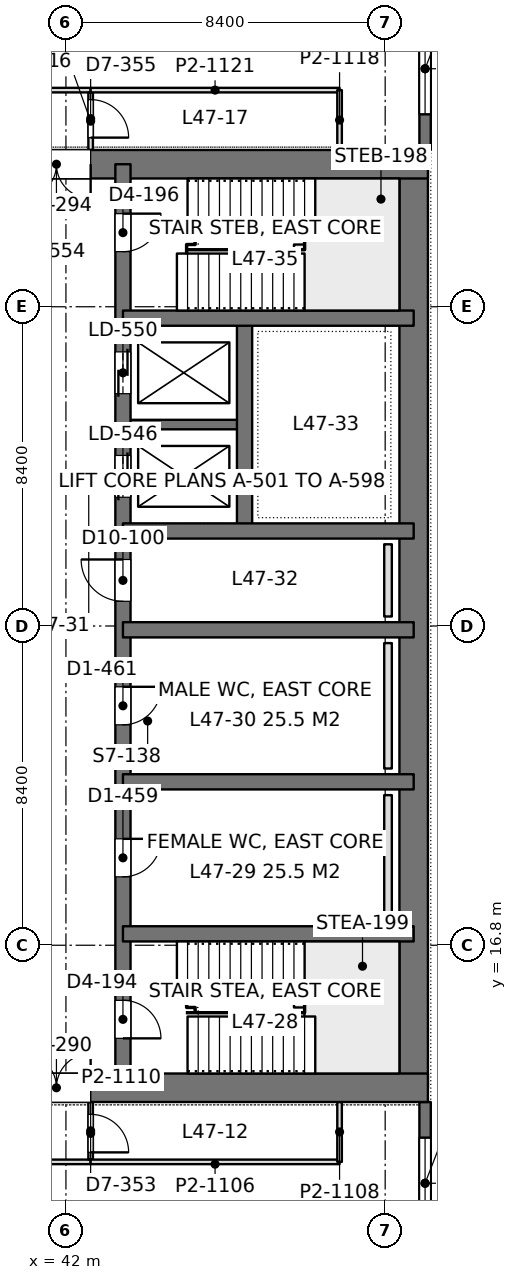
"""IFC4 building model, lengths in metres.
Left out: names, types, materials, properties, quantities, classifications, styles, units other than length and angle.
Written with IfcOpenShell. Run it as: python <this file> out.ifc"""

import sys

from ifc_helpers import new_model, si_unit, direction, frame, frame_2d, origin, place, context, subcontext, project, spatial, rectangle, extrude, element, fill, save


model = new_model("IFC4")
c1 = context("Model", 3, precision=1e-05, world=origin(), true_north=direction((0.0, 1.0)))
c2 = subcontext(c1, "Body", "Model", "MODEL_VIEW")
j1 = project(units=[si_unit("LENGTHUNIT", "METRE"), si_unit("PLANEANGLEUNIT", "RADIAN")], contexts=[c1])
p1 = place(None, origin())
s1 = spatial("IfcSite", under=j1, at=p1, CompositionType="ELEMENT")
p2 = place(p1, origin())
s2 = spatial("IfcBuilding", under=s1, at=p2, CompositionType="ELEMENT")
p3 = place(p2, frame((0.0, 0.0, 207.0)))
s3 = spatial("IfcBuildingStorey", under=s2, at=p3, CompositionType="ELEMENT", Elevation=207.0)
p4 = place(p3, frame((33.675, 13.05, 0.0), z_axis=(0.0, 0.0, 1.0), x_axis=(1.0, 0.0, 0.0)))
e1 = element("IfcWall", 1, at=p4, inside=s3, PredefinedType="SHEAR", context=c2, shape_type="SweptSolid", body=[
    extrude(rectangle(XDim=17.85, YDim=0.75, at=frame_2d((8.925, 0.0))), origin(), (0.0, 0.0, 1.0), 4.2),
])
p5 = place(p4, frame((7.175, 0.0, 0.0)))
e2 = element("IfcOpeningElement", 2, at=p5, cuts=e1, PredefinedType="OPENING", context=c2, shape_type="SweptSolid", body=[
    extrude(rectangle(XDim=1.8, YDim=2.4, at=frame_2d((0.9, 1.2))), frame((0.0, 0.385, 0.0), z_axis=(0.0, -1.0, 0.0), x_axis=(1.0, 0.0, 0.0)), (0.0, 0.0, 1.0), 0.77),
])
p6 = place(p3, frame((33.675, 37.35, 0.0), z_axis=(0.0, 0.0, 1.0), x_axis=(1.0, 0.0, 0.0)))
e3 = element("IfcWall", 3, at=p6, inside=s3, PredefinedType="SHEAR", context=c2, shape_type="SweptSolid", body=[
    extrude(rectangle(XDim=17.85, YDim=0.75, at=frame_2d((8.925, 0.0))), origin(), (0.0, 0.0, 1.0), 4.2),
])
p7 = place(p6, frame((7.175, 0.0, 0.0)))
e4 = element("IfcOpeningElement", 4, at=p7, cuts=e3, PredefinedType="OPENING", context=c2, shape_type="SweptSolid", body=[
    extrude(rectangle(XDim=1.8, YDim=2.4, at=frame_2d((0.9, 1.2))), frame((0.0, 0.385, 0.0), z_axis=(0.0, -1.0, 0.0), x_axis=(1.0, 0.0, 0.0)), (0.0, 0.0, 1.0), 0.77),
])
p8 = place(p3, frame((51.15, 13.05, 0.0), z_axis=(0.0, 0.0, 1.0), x_axis=(0.0, 1.0, 0.0)))
e5 = element("IfcWall", 5, at=p8, inside=s3, PredefinedType="SHEAR", context=c2, shape_type="SweptSolid", body=[
    extrude(rectangle(XDim=24.3, YDim=0.75, at=frame_2d((12.15, 0.0))), origin(), (0.0, 0.0, 1.0), 4.2),
])
p9 = place(p3, frame((43.5, 13.05, 0.0), z_axis=(0.0, 0.0, 1.0), x_axis=(0.0, 1.0, 0.0)))
e6 = element("IfcWall", 6, at=p9, inside=s3, PredefinedType="SHEAR", context=c2, shape_type="SweptSolid", body=[
    extrude(rectangle(XDim=24.3, YDim=0.4, at=frame_2d((12.15, 0.0))), origin(), (0.0, 0.0, 1.0), 4.2),
])
p10 = place(p9, frame((1.3, 0.0, 0.0)))
e7 = element("IfcOpeningElement", 7, at=p10, cuts=e6, PredefinedType="OPENING", context=c2, shape_type="SweptSolid", body=[
    extrude(rectangle(XDim=1.0, YDim=2.2, at=frame_2d((0.5, 1.1))), frame((0.0, 0.21, 0.0), z_axis=(0.0, -1.0, 0.0), x_axis=(1.0, 0.0, 0.0)), (0.0, 0.0, 1.0), 0.42),
])
p11 = place(p9, frame((22.0, 0.0, 0.0)))
e8 = element("IfcOpeningElement", 8, at=p11, cuts=e6, PredefinedType="OPENING", context=c2, shape_type="SweptSolid", body=[
    extrude(rectangle(XDim=1.0, YDim=2.2, at=frame_2d((0.5, 1.1))), frame((0.0, 0.21, 0.0), z_axis=(0.0, -1.0, 0.0), x_axis=(1.0, 0.0, 0.0)), (0.0, 0.0, 1.0), 0.42),
])
p12 = place(p9, frame((5.55, 0.0, 0.0)))
e9 = element("IfcOpeningElement", 9, at=p12, cuts=e6, PredefinedType="OPENING", context=c2, shape_type="SweptSolid", body=[
    extrude(rectangle(XDim=1.0, YDim=2.2, at=frame_2d((0.5, 1.1))), frame((0.0, 0.21, 0.0), z_axis=(0.0, -1.0, 0.0), x_axis=(1.0, 0.0, 0.0)), (0.0, 0.0, 1.0), 0.42),
])
p13 = place(p9, frame((9.55, 0.0, 0.0)))
e10 = element("IfcOpeningElement", 10, at=p13, cuts=e6, PredefinedType="OPENING", context=c2, shape_type="SweptSolid", body=[
    extrude(rectangle(XDim=1.0, YDim=2.2, at=frame_2d((0.5, 1.1))), frame((0.0, 0.21, 0.0), z_axis=(0.0, -1.0, 0.0), x_axis=(1.0, 0.0, 0.0)), (0.0, 0.0, 1.0), 0.42),
])
p14 = place(p9, frame((12.8, 0.0, 0.0)))
e11 = element("IfcOpeningElement", 11, at=p14, cuts=e6, PredefinedType="OPENING", context=c2, shape_type="SweptSolid", body=[
    extrude(rectangle(XDim=1.1, YDim=2.2, at=frame_2d((0.55, 1.1))), frame((0.0, 0.21, 0.0), z_axis=(0.0, -1.0, 0.0), x_axis=(1.0, 0.0, 0.0)), (0.0, 0.0, 1.0), 0.42),
])
p15 = place(p9, frame((15.538, 0.0, 0.0)))
e12 = element("IfcOpeningElement", 12, at=p15, cuts=e6, PredefinedType="OPENING", context=c2, shape_type="SweptSolid", body=[
    extrude(rectangle(XDim=1.1, YDim=2.2, at=frame_2d((0.55, 1.1))), frame((0.0, 0.21, 0.0), z_axis=(0.0, -1.0, 0.0), x_axis=(1.0, 0.0, 0.0)), (0.0, 0.0, 1.0), 0.42),
])
p16 = place(p9, frame((18.262, 0.0, 0.0)))
e13 = element("IfcOpeningElement", 13, at=p16, cuts=e6, PredefinedType="OPENING", context=c2, shape_type="SweptSolid", body=[
    extrude(rectangle(XDim=1.1, YDim=2.2, at=frame_2d((0.55, 1.1))), frame((0.0, 0.21, 0.0), z_axis=(0.0, -1.0, 0.0), x_axis=(1.0, 0.0, 0.0)), (0.0, 0.0, 1.0), 0.42),
])
for number, where, z_axis, x_axis in (
    (14, (51.15, 17.1, 0.0), (0.0, 0.0, 1.0), (-1.0, 0.0, 0.0)),
    (15, (51.15, 21.1, 0.0), (0.0, 0.0, 1.0), (-1.0, 0.0, 0.0)),
    (16, (51.15, 25.1, 0.0), (0.0, 0.0, 1.0), (-1.0, 0.0, 0.0)),
    (17, (51.15, 27.7, 0.0), (0.0, 0.0, 1.0), (-1.0, 0.0, 0.0)),
    (18, (51.15, 33.3, 0.0), (0.0, 0.0, 1.0), (-1.0, 0.0, 0.0)),
):
    element("IfcWall", number, at=place(p3, frame(where, z_axis=z_axis, x_axis=x_axis)), inside=s3, PredefinedType="SHEAR", context=c2, shape_type="SweptSolid", body=[
        extrude(rectangle(XDim=7.65, YDim=0.4, at=frame_2d((3.825, 0.0))), origin(), (0.0, 0.0, 1.0), 4.2),
    ])
p17 = place(p3, frame((46.7, 27.7, 0.0), z_axis=(0.0, 0.0, 1.0), x_axis=(0.0, 1.0, 0.0)))
e19 = element("IfcWall", 19, at=p17, inside=s3, PredefinedType="SHEAR", context=c2, shape_type="SweptSolid", body=[
    extrude(rectangle(XDim=5.6, YDim=0.4, at=frame_2d((2.8, 0.0))), origin(), (0.0, 0.0, 1.0), 4.2),
])
p18 = place(p3, frame((46.7, 30.5, 0.0), z_axis=(0.0, 0.0, 1.0), x_axis=(-1.0, 0.0, 0.0)))
e20 = element("IfcWall", 20, at=p18, inside=s3, PredefinedType="SHEAR", context=c2, shape_type="SweptSolid", body=[
    extrude(rectangle(XDim=3.2, YDim=0.25, at=frame_2d((1.6, 0.0))), origin(), (0.0, 0.0, 1.0), 4.2),
])
p19 = place(p3, frame((51.45, 42.0, 0.0), z_axis=(0.0, 0.0, 1.0), x_axis=(0.0, -1.0, 0.0)))
e21 = element("IfcWall", 21, at=p19, inside=s3, PredefinedType="SOLIDWALL", context=c2, shape_type="SweptSolid", body=[
    extrude(rectangle(XDim=4.275, YDim=0.3, at=frame_2d((2.137, 0.0))), origin(), (0.0, 0.0, 1.0), 4.05),
])
p20 = place(p19, frame((0.938, 0.0, 0.9)))
e22 = element("IfcOpeningElement", 22, at=p20, cuts=e21, PredefinedType="OPENING", context=c2, shape_type="SweptSolid", body=[
    extrude(rectangle(XDim=2.4, YDim=1.9, at=frame_2d((1.2, 0.95))), frame((0.0, 0.16, 0.0), z_axis=(0.0, -1.0, 0.0), x_axis=(1.0, 0.0, 0.0)), (0.0, 0.0, 1.0), 0.32),
])
p21 = place(p3, frame((51.45, 12.675, 0.0), z_axis=(0.0, 0.0, 1.0), x_axis=(0.0, -1.0, 0.0)))
e23 = element("IfcWall", 23, at=p21, inside=s3, PredefinedType="SOLIDWALL", context=c2, shape_type="SweptSolid", body=[
    extrude(rectangle(XDim=4.275, YDim=0.3, at=frame_2d((2.138, 0.0))), origin(), (0.0, 0.0, 1.0), 4.05),
])
p22 = place(p21, frame((0.938, 0.0, 0.9)))
e24 = element("IfcOpeningElement", 24, at=p22, cuts=e23, PredefinedType="OPENING", context=c2, shape_type="SweptSolid", body=[
    extrude(rectangle(XDim=2.4, YDim=1.9, at=frame_2d((1.2, 0.95))), frame((0.0, 0.16, 0.0), z_axis=(0.0, -1.0, 0.0), x_axis=(1.0, 0.0, 0.0)), (0.0, 0.0, 1.0), 0.32),
])
p23 = place(p3, frame((7.748, 11.1, 0.0), z_axis=(0.0, 0.0, 1.0), x_axis=(1.0, 0.0, 0.0)))
e25 = element("IfcWall", 25, at=p23, inside=s3, PredefinedType="PARTITIONING", context=c2, shape_type="SweptSolid", body=[
    extrude(rectangle(XDim=34.904, YDim=0.12, at=frame_2d((17.452, 0.0))), origin(), (0.0, 0.0, 1.0), 3.55),
])
p24 = place(p23, frame((2.119, 0.0, 0.0)))
e26 = element("IfcOpeningElement", 26, at=p24, cuts=e25, PredefinedType="OPENING", context=c2, shape_type="SweptSolid", body=[
    extrude(rectangle(XDim=1.8, YDim=2.2, at=frame_2d((0.9, 1.1))), frame((0.0, 0.07, 0.0), z_axis=(0.0, -1.0, 0.0), x_axis=(1.0, 0.0, 0.0)), (0.0, 0.0, 1.0), 0.14),
])
p25 = place(p23, frame((5.135, 0.0, 0.0)))
e27 = element("IfcOpeningElement", 27, at=p25, cuts=e25, PredefinedType="OPENING", context=c2, shape_type="SweptSolid", body=[
    extrude(rectangle(XDim=1.8, YDim=2.2, at=frame_2d((0.9, 1.1))), frame((0.0, 0.07, 0.0), z_axis=(0.0, -1.0, 0.0), x_axis=(1.0, 0.0, 0.0)), (0.0, 0.0, 1.0), 0.14),
])
p26 = place(p23, frame((13.752, 0.0, 0.0)))
e28 = element("IfcOpeningElement", 28, at=p26, cuts=e25, PredefinedType="OPENING", context=c2, shape_type="SweptSolid", body=[
    extrude(rectangle(XDim=1.8, YDim=2.2, at=frame_2d((0.9, 1.1))), frame((0.0, 0.07, 0.0), z_axis=(0.0, -1.0, 0.0), x_axis=(1.0, 0.0, 0.0)), (0.0, 0.0, 1.0), 0.14),
])
p27 = place(p23, frame((19.352, 0.0, 0.0)))
e29 = element("IfcOpeningElement", 29, at=p27, cuts=e25, PredefinedType="OPENING", context=c2, shape_type="SweptSolid", body=[
    extrude(rectangle(XDim=1.8, YDim=2.2, at=frame_2d((0.9, 1.1))), frame((0.0, 0.07, 0.0), z_axis=(0.0, -1.0, 0.0), x_axis=(1.0, 0.0, 0.0)), (0.0, 0.0, 1.0), 0.14),
])
p28 = place(p23, frame((27.969, 0.0, 0.0)))
e30 = element("IfcOpeningElement", 30, at=p28, cuts=e25, PredefinedType="OPENING", context=c2, shape_type="SweptSolid", body=[
    extrude(rectangle(XDim=1.8, YDim=2.2, at=frame_2d((0.9, 1.1))), frame((0.0, 0.07, 0.0), z_axis=(0.0, -1.0, 0.0), x_axis=(1.0, 0.0, 0.0)), (0.0, 0.0, 1.0), 0.14),
])
p29 = place(p23, frame((30.985, 0.0, 0.0)))
e31 = element("IfcOpeningElement", 31, at=p29, cuts=e25, PredefinedType="OPENING", context=c2, shape_type="SweptSolid", body=[
    extrude(rectangle(XDim=1.8, YDim=2.2, at=frame_2d((0.9, 1.1))), frame((0.0, 0.07, 0.0), z_axis=(0.0, -1.0, 0.0), x_axis=(1.0, 0.0, 0.0)), (0.0, 0.0, 1.0), 0.14),
])
p30 = place(p3, frame((42.65, 11.158, 0.0), z_axis=(0.0, 0.0, 1.0), x_axis=(0.0, 1.0, 0.0)))
e32 = element("IfcWall", 32, at=p30, inside=s3, PredefinedType="PARTITIONING", context=c2, shape_type="SweptSolid", body=[
    extrude(rectangle(XDim=1.518, YDim=0.12, at=frame_2d((0.759, 0.0))), origin(), (0.0, 0.0, 1.0), 4.05),
])
p31 = place(p30, frame((0.192, 0.0, 0.0)))
e33 = element("IfcOpeningElement", 33, at=p31, cuts=e32, PredefinedType="OPENING", context=c2, shape_type="SweptSolid", body=[
    extrude(rectangle(XDim=1.0, YDim=2.4, at=frame_2d((0.5, 1.2))), frame((0.0, 0.07, 0.0), z_axis=(0.0, -1.0, 0.0), x_axis=(1.0, 0.0, 0.0)), (0.0, 0.0, 1.0), 0.14),
])
p32 = place(p3, frame((42.648, 11.1, 0.0), z_axis=(0.0, 0.0, 1.0), x_axis=(1.0, 0.0, 0.0)))
e34 = element("IfcWall", 34, at=p32, inside=s3, PredefinedType="PARTITIONING", context=c2, shape_type="SweptSolid", body=[
    extrude(rectangle(XDim=6.552, YDim=0.12, at=frame_2d((3.276, 0.0))), origin(), (0.0, 0.0, 1.0), 4.05),
])
p33 = place(p3, frame((49.2, 11.1, 0.0), z_axis=(0.0, 0.0, 1.0), x_axis=(0.0, 1.0, 0.0)))
e35 = element("IfcWall", 35, at=p33, inside=s3, PredefinedType="PARTITIONING", context=c2, shape_type="SweptSolid", body=[
    extrude(rectangle(XDim=1.576, YDim=0.12, at=frame_2d((0.788, 0.0))), origin(), (0.0, 0.0, 1.0), 4.05),
])
p34 = place(p3, frame((7.748, 39.3, 0.0), z_axis=(0.0, 0.0, 1.0), x_axis=(1.0, 0.0, 0.0)))
e36 = element("IfcWall", 36, at=p34, inside=s3, PredefinedType="PARTITIONING", context=c2, shape_type="SweptSolid", body=[
    extrude(rectangle(XDim=34.904, YDim=0.12, at=frame_2d((17.452, 0.0))), origin(), (0.0, 0.0, 1.0), 3.55),
])
p35 = place(p34, frame((2.119, 0.0, 0.0)))
e37 = element("IfcOpeningElement", 37, at=p35, cuts=e36, PredefinedType="OPENING", context=c2, shape_type="SweptSolid", body=[
    extrude(rectangle(XDim=1.8, YDim=2.2, at=frame_2d((0.9, 1.1))), frame((0.0, 0.07, 0.0), z_axis=(0.0, -1.0, 0.0), x_axis=(1.0, 0.0, 0.0)), (0.0, 0.0, 1.0), 0.14),
])
p36 = place(p34, frame((5.135, 0.0, 0.0)))
e38 = element("IfcOpeningElement", 38, at=p36, cuts=e36, PredefinedType="OPENING", context=c2, shape_type="SweptSolid", body=[
    extrude(rectangle(XDim=1.8, YDim=2.2, at=frame_2d((0.9, 1.1))), frame((0.0, 0.07, 0.0), z_axis=(0.0, -1.0, 0.0), x_axis=(1.0, 0.0, 0.0)), (0.0, 0.0, 1.0), 0.14),
])
p37 = place(p34, frame((13.752, 0.0, 0.0)))
e39 = element("IfcOpeningElement", 39, at=p37, cuts=e36, PredefinedType="OPENING", context=c2, shape_type="SweptSolid", body=[
    extrude(rectangle(XDim=1.8, YDim=2.2, at=frame_2d((0.9, 1.1))), frame((0.0, 0.07, 0.0), z_axis=(0.0, -1.0, 0.0), x_axis=(1.0, 0.0, 0.0)), (0.0, 0.0, 1.0), 0.14),
])
p38 = place(p34, frame((19.352, 0.0, 0.0)))
e40 = element("IfcOpeningElement", 40, at=p38, cuts=e36, PredefinedType="OPENING", context=c2, shape_type="SweptSolid", body=[
    extrude(rectangle(XDim=1.8, YDim=2.2, at=frame_2d((0.9, 1.1))), frame((0.0, 0.07, 0.0), z_axis=(0.0, -1.0, 0.0), x_axis=(1.0, 0.0, 0.0)), (0.0, 0.0, 1.0), 0.14),
])
p39 = place(p34, frame((27.969, 0.0, 0.0)))
e41 = element("IfcOpeningElement", 41, at=p39, cuts=e36, PredefinedType="OPENING", context=c2, shape_type="SweptSolid", body=[
    extrude(rectangle(XDim=1.8, YDim=2.2, at=frame_2d((0.9, 1.1))), frame((0.0, 0.07, 0.0), z_axis=(0.0, -1.0, 0.0), x_axis=(1.0, 0.0, 0.0)), (0.0, 0.0, 1.0), 0.14),
])
p40 = place(p34, frame((30.985, 0.0, 0.0)))
e42 = element("IfcOpeningElement", 42, at=p40, cuts=e36, PredefinedType="OPENING", context=c2, shape_type="SweptSolid", body=[
    extrude(rectangle(XDim=1.8, YDim=2.2, at=frame_2d((0.9, 1.1))), frame((0.0, 0.07, 0.0), z_axis=(0.0, -1.0, 0.0), x_axis=(1.0, 0.0, 0.0)), (0.0, 0.0, 1.0), 0.14),
])
p41 = place(p3, frame((42.65, 37.724, 0.0), z_axis=(0.0, 0.0, 1.0), x_axis=(0.0, 1.0, 0.0)))
e43 = element("IfcWall", 43, at=p41, inside=s3, PredefinedType="PARTITIONING", context=c2, shape_type="SweptSolid", body=[
    extrude(rectangle(XDim=1.518, YDim=0.12, at=frame_2d((0.759, 0.0))), origin(), (0.0, 0.0, 1.0), 4.05),
])
p42 = place(p41, frame((0.326, 0.0, 0.0)))
e44 = element("IfcOpeningElement", 44, at=p42, cuts=e43, PredefinedType="OPENING", context=c2, shape_type="SweptSolid", body=[
    extrude(rectangle(XDim=1.0, YDim=2.4, at=frame_2d((0.5, 1.2))), frame((0.0, 0.07, 0.0), z_axis=(0.0, -1.0, 0.0), x_axis=(1.0, 0.0, 0.0)), (0.0, 0.0, 1.0), 0.14),
])
p43 = place(p3, frame((42.648, 39.3, 0.0), z_axis=(0.0, 0.0, 1.0), x_axis=(1.0, 0.0, 0.0)))
e45 = element("IfcWall", 45, at=p43, inside=s3, PredefinedType="PARTITIONING", context=c2, shape_type="SweptSolid", body=[
    extrude(rectangle(XDim=6.552, YDim=0.12, at=frame_2d((3.276, 0.0))), origin(), (0.0, 0.0, 1.0), 3.69),
])
p44 = place(p3, frame((49.2, 37.724, 0.0), z_axis=(0.0, 0.0, 1.0), x_axis=(0.0, 1.0, 0.0)))
e46 = element("IfcWall", 46, at=p44, inside=s3, PredefinedType="PARTITIONING", context=c2, shape_type="SweptSolid", body=[
    extrude(rectangle(XDim=1.576, YDim=0.12, at=frame_2d((0.788, 0.0))), origin(), (0.0, 0.0, 1.0), 4.05),
])
for number, where, z_axis, x_axis in (
    (47, (50.475, 17.45, 0.0), (0.0, 0.0, 1.0), (0.0, 1.0, 0.0)),
    (48, (50.475, 21.45, 0.0), (0.0, 0.0, 1.0), (0.0, 1.0, 0.0)),
):
    element("IfcWall", number, at=place(p3, frame(where, z_axis=z_axis, x_axis=x_axis)), inside=s3, PredefinedType="PLUMBINGWALL", context=c2, shape_type="SweptSolid", body=[
        extrude(rectangle(XDim=3.3, YDim=0.2, at=frame_2d((1.65, 0.0))), origin(), (0.0, 0.0, 1.0), 1.2),
    ])
p45 = place(p3, frame((50.475, 25.45, 0.0), z_axis=(0.0, 0.0, 1.0), x_axis=(0.0, 1.0, 0.0)))
e49 = element("IfcWall", 49, at=p45, inside=s3, PredefinedType="PLUMBINGWALL", context=c2, shape_type="SweptSolid", body=[
    extrude(rectangle(XDim=1.9, YDim=0.2, at=frame_2d((0.95, 0.0))), origin(), (0.0, 0.0, 1.0), 1.2),
])
p46 = place(p20, origin())
e50 = element("IfcWindow", 50, at=p46, inside=s3, PartitioningType="SINGLE_PANEL", PredefinedType="WINDOW", context=c2, shape_type="SweptSolid", body=[
    extrude(rectangle(XDim=2.4, YDim=1.9, at=frame_2d((1.2, 0.95))), frame((0.0, 0.03, 0.0), z_axis=(0.0, -1.0, 0.0), x_axis=(1.0, 0.0, 0.0)), (0.0, 0.0, 1.0), 0.06),
])
fill(e22, e50)
p47 = place(p22, origin())
e51 = element("IfcWindow", 51, at=p47, inside=s3, PartitioningType="SINGLE_PANEL", PredefinedType="WINDOW", context=c2, shape_type="SweptSolid", body=[
    extrude(rectangle(XDim=2.4, YDim=1.9, at=frame_2d((1.2, 0.95))), frame((0.0, 0.03, 0.0), z_axis=(0.0, -1.0, 0.0), x_axis=(1.0, 0.0, 0.0)), (0.0, 0.0, 1.0), 0.06),
])
fill(e24, e51)
p48 = place(p5, origin())
e52 = element("IfcDoor", 52, at=p48, inside=s3, OperationType="DOUBLE_DOOR_SINGLE_SWING", PredefinedType="DOOR", context=c2, shape_type="SweptSolid", body=[
    extrude(rectangle(XDim=1.8, YDim=2.4, at=frame_2d((0.9, 1.2))), frame((0.0, 0.025, 0.0), z_axis=(0.0, -1.0, 0.0), x_axis=(1.0, 0.0, 0.0)), (0.0, 0.0, 1.0), 0.05),
])
fill(e2, e52)
p49 = place(p7, frame((1.8, 0.0, 0.0), z_axis=(0.0, 0.0, 1.0), x_axis=(-1.0, 0.0, 0.0)))
e53 = element("IfcDoor", 53, at=p49, inside=s3, OperationType="DOUBLE_DOOR_SINGLE_SWING", PredefinedType="DOOR", context=c2, shape_type="SweptSolid", body=[
    extrude(rectangle(XDim=1.8, YDim=2.4, at=frame_2d((0.9, 1.2))), frame((0.0, 0.025, 0.0), z_axis=(0.0, -1.0, 0.0), x_axis=(1.0, 0.0, 0.0)), (0.0, 0.0, 1.0), 0.05),
])
fill(e4, e53)
p50 = place(p10, frame((1.0, 0.0, 0.0), z_axis=(0.0, 0.0, 1.0), x_axis=(-1.0, 0.0, 0.0)))
e54 = element("IfcDoor", 54, at=p50, inside=s3, OperationType="SINGLE_SWING_RIGHT", PredefinedType="DOOR", context=c2, shape_type="SweptSolid", body=[
    extrude(rectangle(XDim=1.0, YDim=2.2, at=frame_2d((0.5, 1.1))), frame((0.0, 0.025, 0.0), z_axis=(0.0, -1.0, 0.0), x_axis=(1.0, 0.0, 0.0)), (0.0, 0.0, 1.0), 0.05),
])
fill(e7, e54)
p51 = place(p11, frame((1.0, 0.0, 0.0), z_axis=(0.0, 0.0, 1.0), x_axis=(-1.0, 0.0, 0.0)))
e55 = element("IfcDoor", 55, at=p51, inside=s3, OperationType="SINGLE_SWING_LEFT", PredefinedType="DOOR", context=c2, shape_type="SweptSolid", body=[
    extrude(rectangle(XDim=1.0, YDim=2.2, at=frame_2d((0.5, 1.1))), frame((0.0, 0.025, 0.0), z_axis=(0.0, -1.0, 0.0), x_axis=(1.0, 0.0, 0.0)), (0.0, 0.0, 1.0), 0.05),
])
fill(e8, e55)
p52 = place(p12, frame((1.0, 0.0, 0.0), z_axis=(0.0, 0.0, 1.0), x_axis=(-1.0, 0.0, 0.0)))
e56 = element("IfcDoor", 56, at=p52, inside=s3, OperationType="SINGLE_SWING_LEFT", PredefinedType="DOOR", context=c2, shape_type="SweptSolid", body=[
    extrude(rectangle(XDim=1.0, YDim=2.2, at=frame_2d((0.5, 1.1))), frame((0.0, 0.025, 0.0), z_axis=(0.0, -1.0, 0.0), x_axis=(1.0, 0.0, 0.0)), (0.0, 0.0, 1.0), 0.05),
])
fill(e9, e56)
p53 = place(p13, frame((1.0, 0.0, 0.0), z_axis=(0.0, 0.0, 1.0), x_axis=(-1.0, 0.0, 0.0)))
e57 = element("IfcDoor", 57, at=p53, inside=s3, OperationType="SINGLE_SWING_LEFT", PredefinedType="DOOR", context=c2, shape_type="SweptSolid", body=[
    extrude(rectangle(XDim=1.0, YDim=2.2, at=frame_2d((0.5, 1.1))), frame((0.0, 0.025, 0.0), z_axis=(0.0, -1.0, 0.0), x_axis=(1.0, 0.0, 0.0)), (0.0, 0.0, 1.0), 0.05),
])
fill(e10, e57)
p54 = place(p14, origin())
e58 = element("IfcDoor", 58, at=p54, inside=s3, OperationType="SINGLE_SWING_RIGHT", PredefinedType="DOOR", context=c2, shape_type="SweptSolid", body=[
    extrude(rectangle(XDim=1.1, YDim=2.2, at=frame_2d((0.55, 1.1))), frame((0.0, 0.025, 0.0), z_axis=(0.0, -1.0, 0.0), x_axis=(1.0, 0.0, 0.0)), (0.0, 0.0, 1.0), 0.05),
])
fill(e11, e58)
p55 = place(p15, origin())
e59 = element("IfcDoor", 59, at=p55, inside=s3, OperationType="DOUBLE_DOOR_SLIDING", PredefinedType="DOOR", context=c2, shape_type="SweptSolid", body=[
    extrude(rectangle(XDim=1.1, YDim=2.2, at=frame_2d((0.55, 1.1))), frame((0.0, 0.025, 0.0), z_axis=(0.0, -1.0, 0.0), x_axis=(1.0, 0.0, 0.0)), (0.0, 0.0, 1.0), 0.05),
])
fill(e12, e59)
p56 = place(p16, origin())
e60 = element("IfcDoor", 60, at=p56, inside=s3, OperationType="DOUBLE_DOOR_SLIDING", PredefinedType="DOOR", context=c2, shape_type="SweptSolid", body=[
    extrude(rectangle(XDim=1.1, YDim=2.2, at=frame_2d((0.55, 1.1))), frame((0.0, 0.025, 0.0), z_axis=(0.0, -1.0, 0.0), x_axis=(1.0, 0.0, 0.0)), (0.0, 0.0, 1.0), 0.05),
])
fill(e13, e60)
p57 = place(p31, frame((1.0, 0.0, 0.0), z_axis=(0.0, 0.0, 1.0), x_axis=(-1.0, 0.0, 0.0)))
e61 = element("IfcDoor", 61, at=p57, inside=s3, OperationType="SINGLE_SWING_RIGHT", PredefinedType="DOOR", context=c2, shape_type="SweptSolid", body=[
    extrude(rectangle(XDim=1.0, YDim=2.4, at=frame_2d((0.5, 1.2))), frame((0.0, 0.025, 0.0), z_axis=(0.0, -1.0, 0.0), x_axis=(1.0, 0.0, 0.0)), (0.0, 0.0, 1.0), 0.05),
])
fill(e33, e61)
p58 = place(p42, frame((1.0, 0.0, 0.0), z_axis=(0.0, 0.0, 1.0), x_axis=(-1.0, 0.0, 0.0)))
e62 = element("IfcDoor", 62, at=p58, inside=s3, OperationType="SINGLE_SWING_RIGHT", PredefinedType="DOOR", context=c2, shape_type="SweptSolid", body=[
    extrude(rectangle(XDim=1.0, YDim=2.4, at=frame_2d((0.5, 1.2))), frame((0.0, 0.025, 0.0), z_axis=(0.0, -1.0, 0.0), x_axis=(1.0, 0.0, 0.0)), (0.0, 0.0, 1.0), 0.05),
])
fill(e44, e62)
save(model, sys.argv[1])
